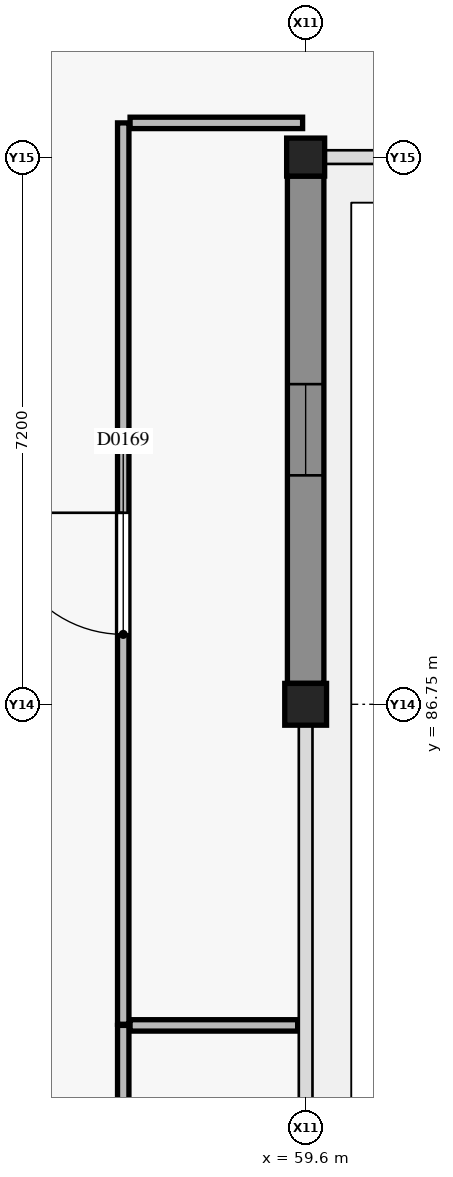
"""IFC4 building model, lengths in metres.
Left out: names, types, materials, properties, quantities, classifications, styles, units other than length and angle.
Written with IfcOpenShell. Run it as: python <this file> out.ifc"""

import sys

from ifc_helpers import new_model, si_unit, direction, frame, frame_2d, origin, origin_2d, place, context, subcontext, project, spatial, rectangle, extrude, element, fill, save


model = new_model("IFC4")
c1 = context("Model", 3, precision=1e-05, world=origin(), true_north=direction((0.0, 1.0)))
c2 = subcontext(c1, "Body", "Model", "MODEL_VIEW")
j1 = project(units=[si_unit("LENGTHUNIT", "METRE"), si_unit("PLANEANGLEUNIT", "RADIAN")], contexts=[c1])
p1 = place(None, origin())
s1 = spatial("IfcSite", under=j1, at=p1, CompositionType="ELEMENT")
p2 = place(p1, origin())
s2 = spatial("IfcBuilding", under=s1, at=p2, CompositionType="ELEMENT")
p3 = place(p2, origin())
s3 = spatial("IfcBuildingStorey", under=s2, at=p3, CompositionType="ELEMENT", Elevation=0.0)
p4 = place(p3, frame((59.6, 86.75, 0.0), z_axis=(0.0, 0.0, 1.0), x_axis=(1.0, 0.0, 0.0)))
e1 = element("IfcColumn", 1, at=p4, inside=s3, PredefinedType="COLUMN", context=c2, shape_type="SweptSolid", body=[
    extrude(rectangle(XDim=0.55, YDim=0.55, at=origin_2d()), origin(), (0.0, 0.0, 1.0), 4.8),
])
p5 = place(p3, frame((59.6, 93.95, 0.0), z_axis=(0.0, 0.0, 1.0), x_axis=(1.0, 0.0, 0.0)))
e2 = element("IfcColumn", 2, at=p5, inside=s3, PredefinedType="COLUMN", context=c2, shape_type="SweptSolid", body=[
    extrude(rectangle(XDim=0.5, YDim=0.5, at=origin_2d()), origin(), (0.0, 0.0, 1.0), 4.8),
])
p6 = place(p3, frame((59.6, 93.7, 0.0), z_axis=(0.0, 0.0, 1.0), x_axis=(0.0, -1.0, 0.0)))
e3 = element("IfcWall", 3, at=p6, inside=s3, PredefinedType="SOLIDWALL", context=c2, shape_type="SweptSolid", body=[
    extrude(rectangle(XDim=6.675, YDim=0.48, at=frame_2d((3.337, 0.0))), origin(), (0.0, 0.0, 1.0), 3.73),
])
p7 = place(p6, frame((2.738, 0.0, 0.9)))
e4 = element("IfcOpeningElement", 4, at=p7, cuts=e3, PredefinedType="OPENING", context=c2, shape_type="SweptSolid", body=[
    extrude(rectangle(XDim=1.2, YDim=1.8, at=frame_2d((0.6, 0.9))), frame((0.0, 0.25, 0.0), z_axis=(0.0, -1.0, 0.0), x_axis=(1.0, 0.0, 0.0)), (0.0, 0.0, 1.0), 0.5),
])
p8 = place(p3, frame((57.2, 70.04, 0.0), z_axis=(0.0, 0.0, 1.0), x_axis=(0.0, 1.0, 0.0)))
e5 = element("IfcWall", 5, at=p8, inside=s3, PredefinedType="PARTITIONING", context=c2, shape_type="SweptSolid", body=[
    extrude(rectangle(XDim=12.485, YDim=0.15, at=frame_2d((6.242, 0.0))), origin(), (0.0, 0.0, 1.0), 3.885),
])
p9 = place(p8, frame((5.742, 0.0, 0.0)))
e6 = element("IfcOpeningElement", 6, at=p9, cuts=e5, PredefinedType="OPENING", context=c2, shape_type="SweptSolid", body=[
    extrude(rectangle(XDim=1.0, YDim=2.15, at=frame_2d((0.5, 1.075))), frame((0.0, 0.085, 0.0), z_axis=(0.0, -1.0, 0.0), x_axis=(1.0, 0.0, 0.0)), (0.0, 0.0, 1.0), 0.17),
])
p10 = place(p3, frame((57.2, 82.54, 0.0), z_axis=(0.0, 0.0, 1.0), x_axis=(0.0, 1.0, 0.0)))
e7 = element("IfcWall", 7, at=p10, inside=s3, PredefinedType="PARTITIONING", context=c2, shape_type="SweptSolid", body=[
    extrude(rectangle(XDim=11.86, YDim=0.15, at=frame_2d((5.93, 0.0))), origin(), (0.0, 0.0, 1.0), 3.835),
])
p11 = place(p10, frame((5.13, 0.0, 0.0)))
e8 = element("IfcOpeningElement", 8, at=p11, cuts=e7, PredefinedType="OPENING", context=c2, shape_type="SweptSolid", body=[
    extrude(rectangle(XDim=1.6, YDim=2.25, at=frame_2d((0.8, 1.125))), frame((0.0, 0.085, 0.0), z_axis=(0.0, -1.0, 0.0), x_axis=(1.0, 0.0, 0.0)), (0.0, 0.0, 1.0), 0.17),
])
p12 = place(p3, frame((57.29, 94.4, 0.0), z_axis=(0.0, 0.0, 1.0), x_axis=(1.0, 0.0, 0.0)))
e9 = element("IfcWall", 9, at=p12, inside=s3, PredefinedType="PARTITIONING", context=c2, shape_type="SweptSolid", body=[
    extrude(rectangle(XDim=2.27, YDim=0.15, at=frame_2d((1.135, 0.0))), origin(), (0.0, 0.0, 1.0), 3.885),
])
p13 = place(p3, frame((57.29, 82.525, 0.0), z_axis=(0.0, 0.0, 1.0), x_axis=(1.0, 0.0, 0.0)))
e10 = element("IfcWall", 10, at=p13, inside=s3, PredefinedType="PARTITIONING", context=c2, shape_type="SweptSolid", body=[
    extrude(rectangle(XDim=2.205, YDim=0.15, at=frame_2d((1.103, 0.0))), origin(), (0.0, 0.0, 1.0), 3.815),
])
p14 = place(p7, origin())
e11 = element("IfcWindow", 11, at=p14, inside=s3, PartitioningType="SINGLE_PANEL", PredefinedType="WINDOW", context=c2, shape_type="SweptSolid", body=[
    extrude(rectangle(XDim=1.2, YDim=1.8, at=frame_2d((0.6, 0.9))), frame((0.0, 0.03, 0.0), z_axis=(0.0, -1.0, 0.0), x_axis=(1.0, 0.0, 0.0)), (0.0, 0.0, 1.0), 0.06),
])
fill(e4, e11)
p15 = place(p11, origin())
e12 = element("IfcDoor", 12, at=p15, inside=s3, OperationType="SINGLE_SWING_RIGHT", PredefinedType="DOOR", context=c2, shape_type="SweptSolid", body=[
    extrude(rectangle(XDim=1.6, YDim=2.25, at=frame_2d((0.8, 1.125))), frame((0.0, 0.025, 0.0), z_axis=(0.0, -1.0, 0.0), x_axis=(1.0, 0.0, 0.0)), (0.0, 0.0, 1.0), 0.05),
])
fill(e8, e12)
save(model, sys.argv[1])
